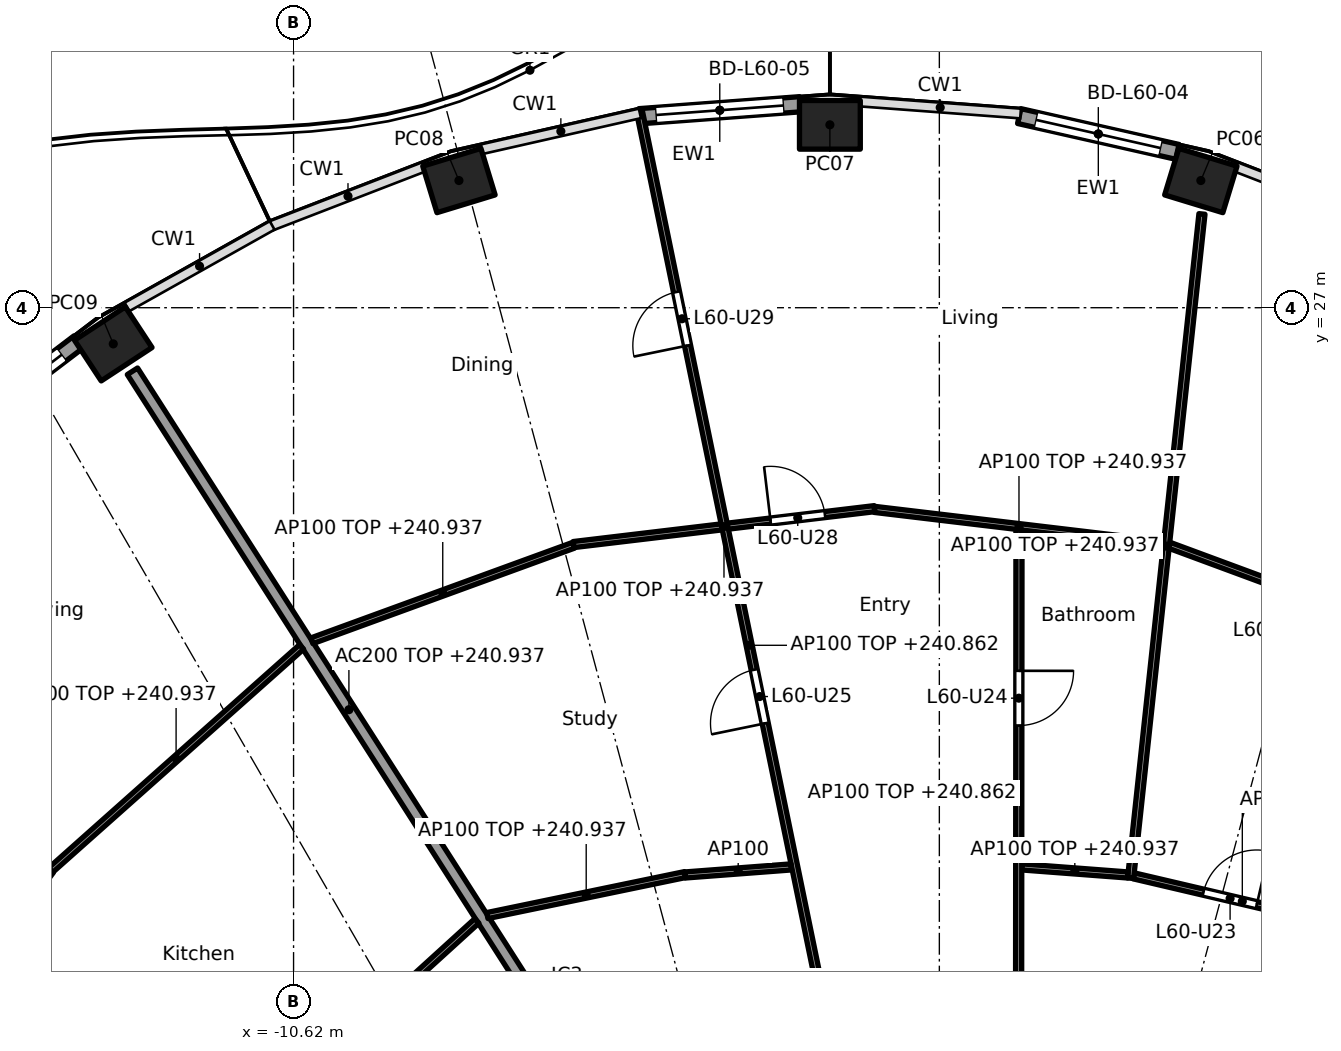
"""IFC4 building model, lengths in metres.
Left out: names, types, materials, properties, quantities, classifications, styles, units other than length and angle.
Written with IfcOpenShell. Run it as: python <this file> out.ifc"""

import sys

from ifc_helpers import new_model, si_unit, direction, frame, frame_2d, origin, origin_2d, place, context, subcontext, project, spatial, rectangle, hollow_rectangle, extrude, element, fill, save


model = new_model("IFC4")
c1 = context("Model", 3, precision=1e-05, world=origin(), true_north=direction((0.0, 1.0)))
c2 = subcontext(c1, "Body", "Model", "MODEL_VIEW")
j1 = project(units=[si_unit("LENGTHUNIT", "METRE"), si_unit("PLANEANGLEUNIT", "RADIAN")], contexts=[c1])
p1 = place(None, origin())
s1 = spatial("IfcSite", under=j1, at=p1, CompositionType="ELEMENT")
p2 = place(p1, origin())
s2 = spatial("IfcBuilding", under=s1, at=p2, CompositionType="ELEMENT")
p3 = place(p2, frame((0.0, 0.0, 238.1)))
s3 = spatial("IfcBuildingStorey", under=s2, at=p3, CompositionType="ELEMENT", Elevation=238.1)
for number, where, z_axis, x_axis in (
    (1, (4.3, 29.092, 0.0), (0.0, 0.0, 1.0), (-0.957, 0.292, 0.0)),
    (2, (-1.8, 30.008, 0.0), (0.0, 0.0, 1.0), (-1.0, 0.0, 0.0)),
    (3, (-7.9, 29.092, 0.0), (0.0, 0.0, 1.0), (-0.957, -0.292, 0.0)),
    (4, (-13.585, 26.405, 0.0), (0.0, 0.0, 1.0), (-0.836, -0.549, 0.0)),
):
    element("IfcColumn", number, at=place(p3, frame(where, z_axis=z_axis, x_axis=x_axis)), inside=s3, PredefinedType="COLUMN", context=c2, shape_type="SweptSolid", body=[
        extrude(hollow_rectangle(XDim=1.0, YDim=0.8, WallThickness=0.032, at=origin_2d()), origin(), (0.0, 0.0, 1.0), 3.7),
    ])
p4 = place(p3, frame((1.314, 30.151, 0.0), z_axis=(0.0, 0.0, 1.0), x_axis=(0.975324089124, -0.220777990694, 0.0)))
e5 = element("IfcWall", 5, at=p4, inside=s3, PredefinedType="SOLIDWALL", context=c2, shape_type="SweptSolid", body=[
    extrude(rectangle(XDim=2.666, YDim=0.25, at=frame_2d((1.333, 0.0))), origin(), (0.0, 0.0, 1.0), 3.44),
])
p5 = place(p4, frame((0.283, 0.0, 0.0)))
e6 = element("IfcOpeningElement", 6, at=p5, cuts=e5, PredefinedType="OPENING", context=c2, shape_type="SweptSolid", body=[
    extrude(rectangle(XDim=2.1, YDim=2.4, at=frame_2d((1.05, 1.2))), frame((0.0, 0.135, 0.0), z_axis=(0.0, -1.0, 0.0), x_axis=(1.0, 0.0, 0.0)), (0.0, 0.0, 1.0), 0.27),
])
p6 = place(p3, frame((-4.932, 30.149, 0.0), z_axis=(0.0, 0.0, 1.0), x_axis=(0.997226380387, 0.07442812815, 0.0)))
e7 = element("IfcWall", 7, at=p6, inside=s3, PredefinedType="SOLIDWALL", context=c2, shape_type="SweptSolid", body=[
    extrude(rectangle(XDim=2.65, YDim=0.25, at=frame_2d((1.325, 0.0))), origin(), (0.0, 0.0, 1.0), 3.44),
])
p7 = place(p6, frame((0.275, 0.0, 0.0)))
e8 = element("IfcOpeningElement", 8, at=p7, cuts=e7, PredefinedType="OPENING", context=c2, shape_type="SweptSolid", body=[
    extrude(rectangle(XDim=2.1, YDim=2.4, at=frame_2d((1.05, 1.2))), frame((0.0, 0.135, 0.0), z_axis=(0.0, -1.0, 0.0), x_axis=(1.0, 0.0, 0.0)), (0.0, 0.0, 1.0), 0.27),
])
p8 = place(p3, frame((-16.377, 24.748, 0.0), z_axis=(0.0, 0.0, 1.0), x_axis=(0.795990084031, 0.60530966135, 0.0)))
e9 = element("IfcWall", 9, at=p8, inside=s3, PredefinedType="SOLIDWALL", context=c2, shape_type="SweptSolid", body=[
    extrude(rectangle(XDim=2.789, YDim=0.25, at=frame_2d((1.394, 0.0))), origin(), (0.0, 0.0, 1.0), 3.44),
])
p9 = place(p8, frame((0.344, 0.0, 0.0)))
e10 = element("IfcOpeningElement", 10, at=p9, cuts=e9, PredefinedType="OPENING", context=c2, shape_type="SweptSolid", body=[
    extrude(rectangle(XDim=2.1, YDim=2.4, at=frame_2d((1.05, 1.2))), frame((0.0, 0.135, 0.0), z_axis=(0.0, -1.0, 0.0), x_axis=(1.0, 0.0, 0.0)), (0.0, 0.0, 1.0), 0.27),
])
p10 = place(p3, frame((-6.15, 14.824, 0.0), z_axis=(0.0, 0.0, 1.0), x_axis=(-0.538870687577, 0.842388498301, 0.0)))
e11 = element("IfcWall", 11, at=p10, inside=s3, PredefinedType="PARTITIONING", context=c2, shape_type="SweptSolid", body=[
    extrude(rectangle(XDim=13.213, YDim=0.2, at=frame_2d((6.606, 0.0))), origin(), (0.0, 0.0, 1.0), 2.837),
])
p11 = place(p3, frame((6.766, 16.82, 0.0), z_axis=(0.0, 0.0, 1.0), x_axis=(-0.973612608559, 0.22820711745, 0.0)))
e12 = element("IfcWall", 12, at=p11, inside=s3, PredefinedType="PARTITIONING", context=c2, shape_type="SweptSolid", body=[
    extrude(rectangle(XDim=3.663, YDim=0.1, at=frame_2d((1.832, 0.0))), origin(), (0.0, 0.0, 1.0), 2.837),
])
p12 = place(p11, frame((1.588, 0.0, 0.0)))
e13 = element("IfcOpeningElement", 13, at=p12, cuts=e12, PredefinedType="OPENING", context=c2, shape_type="SweptSolid", body=[
    extrude(rectangle(XDim=0.9, YDim=2.1, at=frame_2d((0.45, 1.05))), frame((0.0, 0.06, 0.0), z_axis=(0.0, -1.0, 0.0), x_axis=(1.0, 0.0, 0.0)), (0.0, 0.0, 1.0), 0.12),
])
p13 = place(p3, frame((8.331, 21.411, 0.0), z_axis=(0.0, 0.0, 1.0), x_axis=(-0.937891982431, 0.346927412136, 0.0)))
e14 = element("IfcWall", 14, at=p13, inside=s3, PredefinedType="PARTITIONING", context=c2, shape_type="SweptSolid", body=[
    extrude(rectangle(XDim=4.85, YDim=0.1, at=frame_2d((2.425, 0.0))), origin(), (0.0, 0.0, 1.0), 2.837),
])
p14 = place(p13, frame((1.975, 0.0, 0.0)))
e15 = element("IfcOpeningElement", 15, at=p14, cuts=e14, PredefinedType="OPENING", context=c2, shape_type="SweptSolid", body=[
    extrude(rectangle(XDim=0.9, YDim=2.1, at=frame_2d((0.45, 1.05))), frame((0.0, 0.06, 0.0), z_axis=(0.0, -1.0, 0.0), x_axis=(1.0, 0.0, 0.0)), (0.0, 0.0, 1.0), 0.12),
])
p15 = place(p3, frame((3.145, 17.618, 0.0), z_axis=(0.0, 0.0, 1.0), x_axis=(0.106818720076, 0.994278512813, 0.0)))
e16 = element("IfcWall", 16, at=p15, inside=s3, PredefinedType="PARTITIONING", context=c2, shape_type="SweptSolid", body=[
    extrude(rectangle(XDim=10.987, YDim=0.1, at=frame_2d((5.493, 0.0))), origin(), (0.0, 0.0, 1.0), 2.837),
])
p16 = place(p3, frame((3.101, 17.671, 0.0), z_axis=(0.0, 0.0, 1.0), x_axis=(-0.997127864669, 0.075736526859, 0.0)))
e17 = element("IfcWall", 17, at=p16, inside=s3, PredefinedType="PARTITIONING", context=c2, shape_type="SweptSolid", body=[
    extrude(rectangle(XDim=1.75, YDim=0.1, at=frame_2d((0.875, 0.0))), origin(), (0.0, 0.0, 1.0), 2.837),
])
p17 = place(p3, frame((3.686, 23.117, 0.0), z_axis=(0.0, 0.0, 1.0), x_axis=(-0.992965872314, 0.11840091393, 0.0)))
e18 = element("IfcWall", 18, at=p17, inside=s3, PredefinedType="PARTITIONING", context=c2, shape_type="SweptSolid", body=[
    extrude(rectangle(XDim=4.786, YDim=0.1, at=frame_2d((2.393, 0.0))), origin(), (0.0, 0.0, 1.0), 2.837),
])
p18 = place(p3, frame((1.301, 12.665, 0.0), z_axis=(0.0, 0.0, 1.0), x_axis=(0.000776840765, 0.999999698259, 0.0)))
e19 = element("IfcWall", 19, at=p18, inside=s3, PredefinedType="PARTITIONING", context=c2, shape_type="SweptSolid", body=[
    extrude(rectangle(XDim=10.685, YDim=0.1, at=frame_2d((5.343, 0.0))), origin(), (0.0, 0.0, 1.0), 2.762),
])
p19 = place(p18, frame((2.121, 0.0, 0.0)))
e20 = element("IfcOpeningElement", 20, at=p19, cuts=e19, PredefinedType="OPENING", context=c2, shape_type="SweptSolid", body=[
    extrude(rectangle(XDim=0.9, YDim=2.1, at=frame_2d((0.45, 1.05))), frame((0.0, 0.06, 0.0), z_axis=(0.0, -1.0, 0.0), x_axis=(1.0, 0.0, 0.0)), (0.0, 0.0, 1.0), 0.12),
])
p20 = place(p18, frame((7.464, 0.0, 0.0)))
e21 = element("IfcOpeningElement", 21, at=p20, cuts=e19, PredefinedType="OPENING", context=c2, shape_type="SweptSolid", body=[
    extrude(rectangle(XDim=0.9, YDim=2.1, at=frame_2d((0.45, 1.05))), frame((0.0, 0.06, 0.0), z_axis=(0.0, -1.0, 0.0), x_axis=(1.0, 0.0, 0.0)), (0.0, 0.0, 1.0), 0.12),
])
p21 = place(p3, frame((-1.066, 23.695, 0.0), z_axis=(0.0, 0.0, 1.0), x_axis=(-0.992959092097, -0.118457762183, 0.0)))
e22 = element("IfcWall", 22, at=p21, inside=s3, PredefinedType="PARTITIONING", context=c2, shape_type="SweptSolid", body=[
    extrude(rectangle(XDim=4.986, YDim=0.1, at=frame_2d((2.493, 0.0))), origin(), (0.0, 0.0, 1.0), 2.837),
])
p22 = place(p21, frame((0.821, 0.0, 0.0)))
e23 = element("IfcOpeningElement", 23, at=p22, cuts=e22, PredefinedType="OPENING", context=c2, shape_type="SweptSolid", body=[
    extrude(rectangle(XDim=0.9, YDim=2.1, at=frame_2d((0.45, 1.05))), frame((0.0, 0.06, 0.0), z_axis=(0.0, -1.0, 0.0), x_axis=(1.0, 0.0, 0.0)), (0.0, 0.0, 1.0), 0.12),
])
p23 = place(p3, frame((-1.321, 12.663, 0.0), z_axis=(0.0, 0.0, 1.0), x_axis=(-0.201366062305, 0.979516058547, 0.0)))
e24 = element("IfcWall", 24, at=p23, inside=s3, PredefinedType="PARTITIONING", context=c2, shape_type="SweptSolid", body=[
    extrude(rectangle(XDim=17.939, YDim=0.1, at=frame_2d((8.969, 0.0))), origin(), (0.0, 0.0, 1.0), 2.762),
])
p24 = place(p23, frame((2.177, 0.0, 0.0)))
e25 = element("IfcOpeningElement", 25, at=p24, cuts=e24, PredefinedType="OPENING", context=c2, shape_type="SweptSolid", body=[
    extrude(rectangle(XDim=0.9, YDim=2.1, at=frame_2d((0.45, 1.05))), frame((0.0, 0.06, 0.0), z_axis=(0.0, -1.0, 0.0), x_axis=(1.0, 0.0, 0.0)), (0.0, 0.0, 1.0), 0.12),
])
p25 = place(p23, frame((7.659, 0.0, 0.0)))
e26 = element("IfcOpeningElement", 26, at=p25, cuts=e24, PredefinedType="OPENING", context=c2, shape_type="SweptSolid", body=[
    extrude(rectangle(XDim=0.9, YDim=2.1, at=frame_2d((0.45, 1.05))), frame((0.0, 0.06, 0.0), z_axis=(0.0, -1.0, 0.0), x_axis=(1.0, 0.0, 0.0)), (0.0, 0.0, 1.0), 0.12),
])
p26 = place(p23, frame((14.002, 0.0, 0.0)))
e27 = element("IfcOpeningElement", 27, at=p26, cuts=e24, PredefinedType="OPENING", context=c2, shape_type="SweptSolid", body=[
    extrude(rectangle(XDim=0.9, YDim=2.1, at=frame_2d((0.45, 1.05))), frame((0.0, 0.06, 0.0), z_axis=(0.0, -1.0, 0.0), x_axis=(1.0, 0.0, 0.0)), (0.0, 0.0, 1.0), 0.12),
])
p27 = place(p3, frame((-2.435, 17.804, 0.0), z_axis=(0.0, 0.0, 1.0), x_axis=(-0.997128664551, -0.075725995084, 0.0)))
e28 = element("IfcWall", 28, at=p27, inside=s3, PredefinedType="PARTITIONING", context=c2, shape_type="SweptSolid", body=[
    extrude(rectangle(XDim=1.751, YDim=0.1, at=frame_2d((0.875, 0.0))), origin(), (0.0, 0.0, 1.0), 3.44),
])
p28 = place(p3, frame((-4.182, 17.678, 0.0), z_axis=(0.0, 0.0, 1.0), x_axis=(-0.979196996208, -0.202911908517, 0.0)))
e29 = element("IfcWall", 29, at=p28, inside=s3, PredefinedType="PARTITIONING", context=c2, shape_type="SweptSolid", body=[
    extrude(rectangle(XDim=3.321, YDim=0.1, at=frame_2d((1.66, 0.0))), origin(), (0.0, 0.0, 1.0), 2.837),
])
p29 = place(p3, frame((-6.014, 23.094, 0.0), z_axis=(0.0, 0.0, 1.0), x_axis=(-0.939433575811, -0.342731026665, 0.0)))
e30 = element("IfcWall", 30, at=p29, inside=s3, PredefinedType="PARTITIONING", context=c2, shape_type="SweptSolid", body=[
    extrude(rectangle(XDim=4.583, YDim=0.1, at=frame_2d((2.291, 0.0))), origin(), (0.0, 0.0, 1.0), 2.837),
])
p30 = place(p3, frame((-7.605, 16.917, 0.0), z_axis=(0.0, 0.0, 1.0), x_axis=(-0.739828340504, -0.672795679673, 0.0)))
e31 = element("IfcWall", 31, at=p30, inside=s3, PredefinedType="PARTITIONING", context=c2, shape_type="SweptSolid", body=[
    extrude(rectangle(XDim=4.647, YDim=0.1, at=frame_2d((2.324, 0.0))), origin(), (0.0, 0.0, 1.0), 2.837),
])
p31 = place(p30, frame((2.148, 0.0, 0.0)))
e32 = element("IfcOpeningElement", 32, at=p31, cuts=e31, PredefinedType="OPENING", context=c2, shape_type="SweptSolid", body=[
    extrude(rectangle(XDim=0.9, YDim=2.1, at=frame_2d((0.45, 1.05))), frame((0.0, 0.06, 0.0), z_axis=(0.0, -1.0, 0.0), x_axis=(1.0, 0.0, 0.0)), (0.0, 0.0, 1.0), 0.12),
])
p32 = place(p3, frame((-10.488, 21.422, 0.0), z_axis=(0.0, 0.0, 1.0), x_axis=(-0.747153269812, -0.66465178207, 0.0)))
e33 = element("IfcWall", 33, at=p32, inside=s3, PredefinedType="PARTITIONING", context=c2, shape_type="SweptSolid", body=[
    extrude(rectangle(XDim=5.525, YDim=0.1, at=frame_2d((2.762, 0.0))), origin(), (0.0, 0.0, 1.0), 2.837),
])
p33 = place(p3, frame((-14.608, 17.743, 0.0), z_axis=(0.0, 0.0, 1.0), x_axis=(-0.596174489482, -0.8028548923, 0.0)))
e34 = element("IfcWall", 34, at=p33, inside=s3, PredefinedType="PARTITIONING", context=c2, shape_type="SweptSolid", body=[
    extrude(rectangle(XDim=5.442, YDim=0.1, at=frame_2d((2.721, 0.0))), origin(), (0.0, 0.0, 1.0), 2.837),
])
p34 = place(p33, frame((3.631, 0.0, 0.0)))
e35 = element("IfcOpeningElement", 35, at=p34, cuts=e34, PredefinedType="OPENING", context=c2, shape_type="SweptSolid", body=[
    extrude(rectangle(XDim=0.9, YDim=2.1, at=frame_2d((0.45, 1.05))), frame((0.0, 0.06, 0.0), z_axis=(0.0, -1.0, 0.0), x_axis=(1.0, 0.0, 0.0)), (0.0, 0.0, 1.0), 0.12),
])
p35 = place(p5, origin())
e36 = element("IfcDoor", 36, at=p35, inside=s3, OperationType="SLIDING_TO_LEFT", PredefinedType="DOOR", context=c2, shape_type="SweptSolid", body=[
    extrude(rectangle(XDim=2.1, YDim=2.4, at=frame_2d((1.05, 1.2))), frame((0.0, 0.025, 0.0), z_axis=(0.0, -1.0, 0.0), x_axis=(1.0, 0.0, 0.0)), (0.0, 0.0, 1.0), 0.05),
])
fill(e6, e36)
p36 = place(p7, origin())
e37 = element("IfcDoor", 37, at=p36, inside=s3, OperationType="SLIDING_TO_LEFT", PredefinedType="DOOR", context=c2, shape_type="SweptSolid", body=[
    extrude(rectangle(XDim=2.1, YDim=2.4, at=frame_2d((1.05, 1.2))), frame((0.0, 0.025, 0.0), z_axis=(0.0, -1.0, 0.0), x_axis=(1.0, 0.0, 0.0)), (0.0, 0.0, 1.0), 0.05),
])
fill(e8, e37)
p37 = place(p9, origin())
e38 = element("IfcDoor", 38, at=p37, inside=s3, OperationType="SLIDING_TO_LEFT", PredefinedType="DOOR", context=c2, shape_type="SweptSolid", body=[
    extrude(rectangle(XDim=2.1, YDim=2.4, at=frame_2d((1.05, 1.2))), frame((0.0, 0.025, 0.0), z_axis=(0.0, -1.0, 0.0), x_axis=(1.0, 0.0, 0.0)), (0.0, 0.0, 1.0), 0.05),
])
fill(e10, e38)
p38 = place(p12, frame((0.9, 0.0, 0.0), x_axis=(-1.0, 0.0, 0.0)))
e39 = element("IfcDoor", 39, at=p38, inside=s3, OperationType="SINGLE_SWING_RIGHT", PredefinedType="DOOR", context=c2, shape_type="SweptSolid", body=[
    extrude(rectangle(XDim=0.9, YDim=2.1, at=frame_2d((0.45, 1.05))), frame((0.0, 0.025, 0.0), z_axis=(0.0, -1.0, 0.0), x_axis=(1.0, 0.0, 0.0)), (0.0, 0.0, 1.0), 0.05),
])
fill(e13, e39)
p39 = place(p20, frame((0.9, 0.0, 0.0), x_axis=(-1.0, 0.0, 0.0)))
e40 = element("IfcDoor", 40, at=p39, inside=s3, OperationType="SINGLE_SWING_LEFT", PredefinedType="DOOR", context=c2, shape_type="SweptSolid", body=[
    extrude(rectangle(XDim=0.9, YDim=2.1, at=frame_2d((0.45, 1.05))), frame((0.0, 0.025, 0.0), z_axis=(0.0, -1.0, 0.0), x_axis=(1.0, 0.0, 0.0)), (0.0, 0.0, 1.0), 0.05),
])
fill(e21, e40)
p40 = place(p25, origin())
e41 = element("IfcDoor", 41, at=p40, inside=s3, OperationType="SINGLE_SWING_LEFT", PredefinedType="DOOR", context=c2, shape_type="SweptSolid", body=[
    extrude(rectangle(XDim=0.9, YDim=2.1, at=frame_2d((0.45, 1.05))), frame((0.0, 0.025, 0.0), z_axis=(0.0, -1.0, 0.0), x_axis=(1.0, 0.0, 0.0)), (0.0, 0.0, 1.0), 0.05),
])
fill(e26, e41)
p41 = place(p22, frame((0.9, 0.0, 0.0), x_axis=(-1.0, 0.0, 0.0)))
e42 = element("IfcDoor", 42, at=p41, inside=s3, OperationType="SINGLE_SWING_LEFT", PredefinedType="DOOR", context=c2, shape_type="SweptSolid", body=[
    extrude(rectangle(XDim=0.9, YDim=2.1, at=frame_2d((0.45, 1.05))), frame((0.0, 0.025, 0.0), z_axis=(0.0, -1.0, 0.0), x_axis=(1.0, 0.0, 0.0)), (0.0, 0.0, 1.0), 0.05),
])
fill(e23, e42)
p42 = place(p26, origin())
e43 = element("IfcDoor", 43, at=p42, inside=s3, OperationType="SINGLE_SWING_LEFT", PredefinedType="DOOR", context=c2, shape_type="SweptSolid", body=[
    extrude(rectangle(XDim=0.9, YDim=2.1, at=frame_2d((0.45, 1.05))), frame((0.0, 0.025, 0.0), z_axis=(0.0, -1.0, 0.0), x_axis=(1.0, 0.0, 0.0)), (0.0, 0.0, 1.0), 0.05),
])
fill(e27, e43)
save(model, sys.argv[1])
